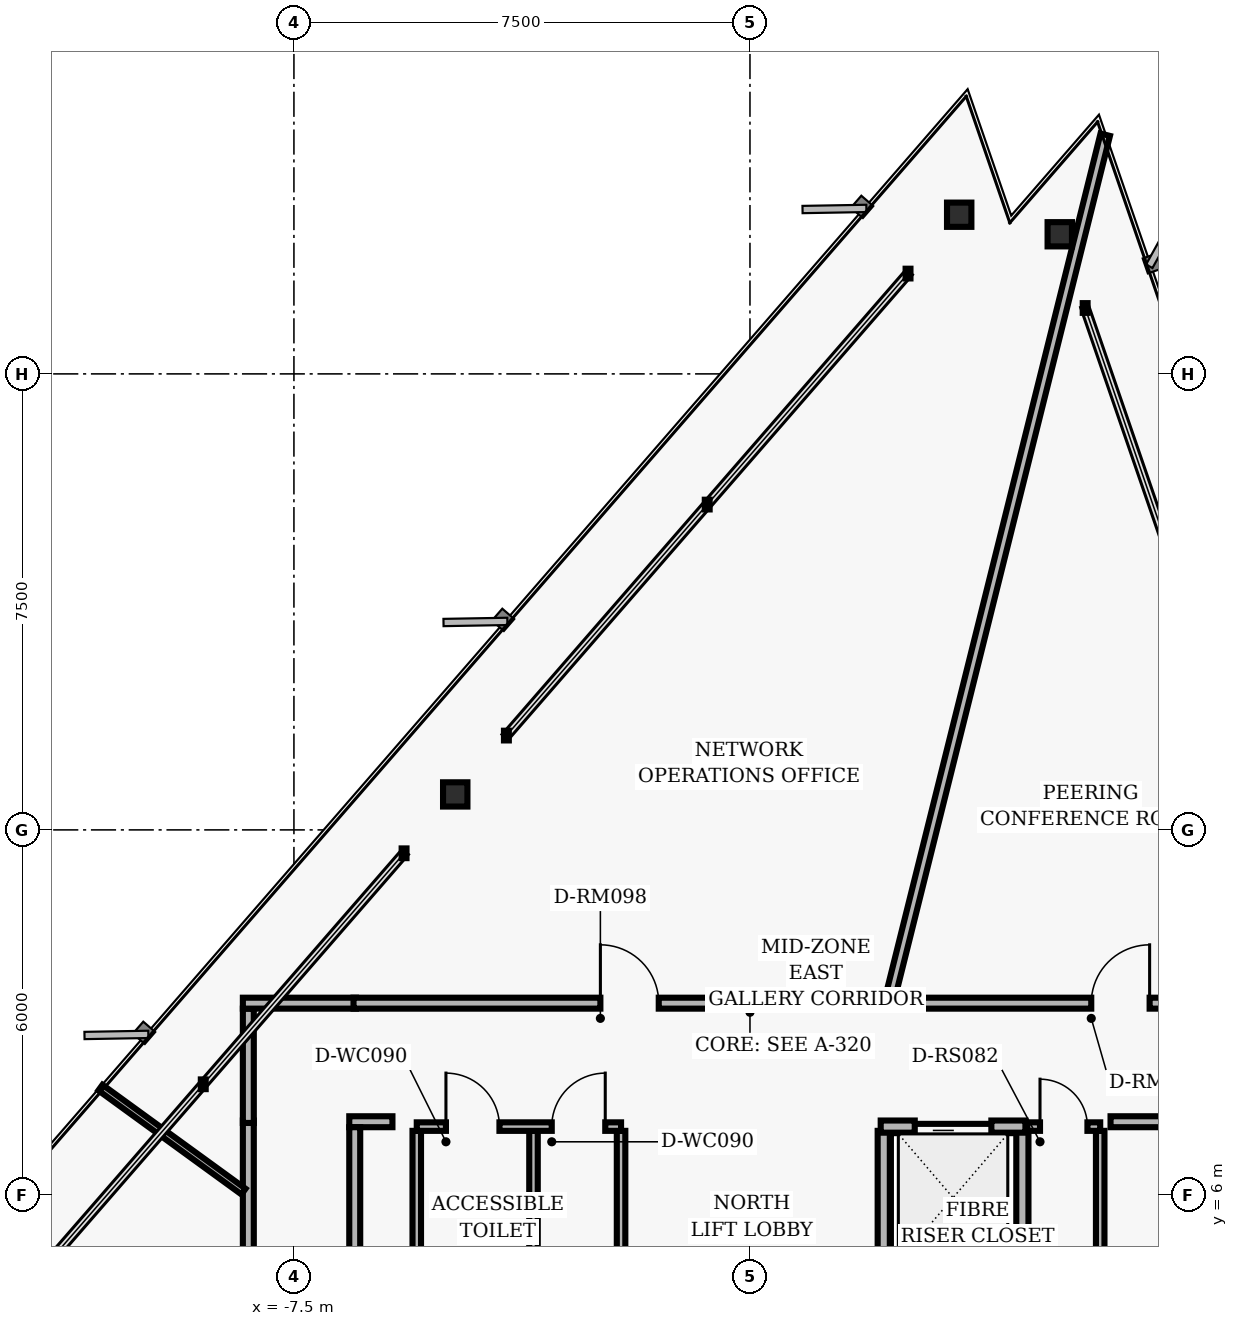
"""IFC4 building model, lengths in metres.
Left out: names, types, materials, properties, quantities, classifications, styles, units other than length and angle.
Written with IfcOpenShell. Run it as: python <this file> out.ifc"""

import sys

from ifc_helpers import new_model, si_unit, direction, frame, frame_2d, origin, origin_2d, place, context, subcontext, project, spatial, rectangle, i_section, extrude, element, fill, save


model = new_model("IFC4")
c1 = context("Model", 3, precision=1e-05, world=origin(), true_north=direction((0.0, 1.0)))
c2 = subcontext(c1, "Body", "Model", "MODEL_VIEW")
j1 = project(units=[si_unit("LENGTHUNIT", "METRE"), si_unit("PLANEANGLEUNIT", "RADIAN")], contexts=[c1])
p1 = place(None, origin())
s1 = spatial("IfcSite", under=j1, at=p1, CompositionType="ELEMENT")
p2 = place(p1, origin())
s2 = spatial("IfcBuilding", under=s1, at=p2, CompositionType="ELEMENT")
p3 = place(p2, frame((0.0, 0.0, 153.28)))
s3 = spatial("IfcBuildingStorey", under=s2, at=p3, CompositionType="ELEMENT", Elevation=153.28)
for number, where, z_axis, x_axis in (
    (1, (5.095, 21.796, 0.0), (0.0, 0.0, 1.0), (1.0, 0.0, 0.0)),
    (2, (3.441, 22.118, 0.0), (0.0, 0.0, 1.0), (1.0, 0.0, 0.0)),
    (3, (-4.847, 12.583, 0.0), (0.0, 0.0, 1.0), (1.0, 0.0, 0.0)),
):
    element("IfcColumn", number, at=place(p3, frame(where, z_axis=z_axis, x_axis=x_axis)), inside=s3, PredefinedType="COLUMN", context=c2, shape_type="SweptSolid", body=[
        extrude(i_section(OverallWidth=0.401, OverallDepth=0.399, WebThickness=0.025, FlangeThickness=0.04, FilletRadius=0.018, at=origin_2d()), origin(), (0.0, 0.0, 1.0), 3.04),
    ])
for number, where, z_axis, x_axis in (
    (4, (2.2, 4.95, 0.0), (0.0, 0.0, 1.0), (0.0, 1.0, 0.0)),
    (5, (4.48, 4.95, 0.0), (0.0, 0.0, 1.0), (0.0, 1.0, 0.0)),
):
    element("IfcWall", number, at=place(p3, frame(where, z_axis=z_axis, x_axis=x_axis)), inside=s3, PredefinedType="PARTITIONING", context=c2, shape_type="SweptSolid", body=[
        extrude(rectangle(XDim=2.1, YDim=0.2, at=frame_2d((1.05, 0.0))), origin(), (0.0, 0.0, 1.0), 2.763),
    ])
p4 = place(p3, frame((2.15, 7.12, 0.0), z_axis=(0.0, 0.0, 1.0), x_axis=(1.0, 0.0, 0.0)))
e6 = element("IfcWall", 6, at=p4, inside=s3, PredefinedType="PARTITIONING", context=c2, shape_type="SweptSolid", body=[
    extrude(rectangle(XDim=2.38, YDim=0.2, at=frame_2d((1.19, 0.0))), origin(), (0.0, 0.0, 1.0), 2.763),
])
p5 = place(p4, frame((0.56, 0.0, 0.0)))
e7 = element("IfcOpeningElement", 7, at=p5, cuts=e6, PredefinedType="OPENING", context=c2, shape_type="SweptSolid", body=[
    extrude(rectangle(XDim=1.26, YDim=2.06, at=frame_2d((0.63, 1.03))), frame((0.0, 0.11, 0.0), z_axis=(0.0, -1.0, 0.0), x_axis=(1.0, 0.0, 0.0)), (0.0, 0.0, 1.0), 0.22),
])
for number, where, z_axis, x_axis in (
    (8, (-5.48, 4.95, 0.0), (0.0, 0.0, 1.0), (0.0, 1.0, 0.0)),
    (9, (-3.56, 4.95, 0.0), (0.0, 0.0, 1.0), (0.0, 1.0, 0.0)),
    (10, (-2.12, 4.95, 0.0), (0.0, 0.0, 1.0), (0.0, 1.0, 0.0)),
):
    element("IfcWall", number, at=place(p3, frame(where, z_axis=z_axis, x_axis=x_axis)), inside=s3, PredefinedType="PARTITIONING", context=c2, shape_type="SweptSolid", body=[
        extrude(rectangle(XDim=2.1, YDim=0.14, at=frame_2d((1.05, 0.0))), origin(), (0.0, 0.0, 1.0), 2.763),
    ])
p6 = place(p3, frame((-5.48, 7.12, 0.0), z_axis=(0.0, 0.0, 1.0), x_axis=(1.0, 0.0, 0.0)))
e11 = element("IfcWall", 11, at=p6, inside=s3, PredefinedType="PARTITIONING", context=c2, shape_type="SweptSolid", body=[
    extrude(rectangle(XDim=3.36, YDim=0.14, at=frame_2d((1.68, 0.0))), origin(), (0.0, 0.0, 1.0), 2.763),
])
p7 = place(p6, frame((0.48, 0.0, 0.0)))
e12 = element("IfcOpeningElement", 12, at=p7, cuts=e11, PredefinedType="OPENING", context=c2, shape_type="SweptSolid", body=[
    extrude(rectangle(XDim=0.88, YDim=2.02, at=frame_2d((0.44, 1.01))), frame((0.0, 0.08, 0.0), z_axis=(0.0, -1.0, 0.0), x_axis=(1.0, 0.0, 0.0)), (0.0, 0.0, 1.0), 0.16),
])
p8 = place(p6, frame((2.22, 0.0, 0.0)))
e13 = element("IfcOpeningElement", 13, at=p8, cuts=e11, PredefinedType="OPENING", context=c2, shape_type="SweptSolid", body=[
    extrude(rectangle(XDim=0.88, YDim=2.02, at=frame_2d((0.44, 1.01))), frame((0.0, 0.08, 0.0), z_axis=(0.0, -1.0, 0.0), x_axis=(1.0, 0.0, 0.0)), (0.0, 0.0, 1.0), 0.16),
])
p9 = place(p3, frame((5.76, 4.95, 0.0), z_axis=(0.0, 0.0, 1.0), x_axis=(0.0, 1.0, 0.0)))
e14 = element("IfcWall", 14, at=p9, inside=s3, PredefinedType="PARTITIONING", context=c2, shape_type="SweptSolid", body=[
    extrude(rectangle(XDim=2.1, YDim=0.14, at=frame_2d((1.05, 0.0))), origin(), (0.0, 0.0, 1.0), 2.763),
])
p10 = place(p3, frame((4.56, 7.12, 0.0), z_axis=(0.0, 0.0, 1.0), x_axis=(1.0, 0.0, 0.0)))
e15 = element("IfcWall", 15, at=p10, inside=s3, PredefinedType="PARTITIONING", context=c2, shape_type="SweptSolid", body=[
    extrude(rectangle(XDim=1.2, YDim=0.14, at=frame_2d((0.6, 0.0))), origin(), (0.0, 0.0, 1.0), 2.763),
])
p11 = place(p10, frame((0.21, 0.0, 0.0)))
e16 = element("IfcOpeningElement", 16, at=p11, cuts=e15, PredefinedType="OPENING", context=c2, shape_type="SweptSolid", body=[
    extrude(rectangle(XDim=0.78, YDim=2.01, at=frame_2d((0.39, 1.005))), frame((0.0, 0.08, 0.0), z_axis=(0.0, -1.0, 0.0), x_axis=(1.0, 0.0, 0.0)), (0.0, 0.0, 1.0), 0.16),
])
p12 = place(p3, frame((-8.25, -7.22, 0.0), z_axis=(0.0, 0.0, 1.0), x_axis=(0.0, 1.0, 0.0)))
e17 = element("IfcWall", 17, at=p12, inside=s3, PredefinedType="PARTITIONING", context=c2, shape_type="SweptSolid", body=[
    extrude(rectangle(XDim=14.44, YDim=0.18, at=frame_2d((7.22, 0.0))), origin(), (0.0, 0.0, 1.0), 2.763),
])
p13 = place(p12, frame((7.366, 0.0, 0.0)))
e18 = element("IfcOpeningElement", 18, at=p13, cuts=e17, PredefinedType="OPENING", context=c2, shape_type="SweptSolid", body=[
    extrude(rectangle(XDim=0.96, YDim=2.02, at=frame_2d((0.48, 1.01))), frame((0.0, 0.1, 0.0), z_axis=(0.0, -1.0, 0.0), x_axis=(1.0, 0.0, 0.0)), (0.0, 0.0, 1.0), 0.2),
])
p14 = place(p3, frame((-8.25, 7.18, 0.0), z_axis=(0.0, 0.0, 1.0), x_axis=(0.0, 1.0, 0.0)))
e19 = element("IfcWall", 19, at=p14, inside=s3, PredefinedType="PARTITIONING", context=c2, shape_type="SweptSolid", body=[
    extrude(rectangle(XDim=1.88, YDim=0.18, at=frame_2d((0.94, 0.0))), origin(), (0.0, 0.0, 1.0), 2.763),
])
p15 = place(p3, frame((-8.34, 9.15, 0.0), z_axis=(0.0, 0.0, 1.0), x_axis=(1.0, 0.0, 0.0)))
e20 = element("IfcWall", 20, at=p15, inside=s3, PredefinedType="PARTITIONING", context=c2, shape_type="SweptSolid", body=[
    extrude(rectangle(XDim=1.86, YDim=0.18, at=frame_2d((0.93, 0.0))), origin(), (0.0, 0.0, 1.0), 2.763),
])
p16 = place(p3, frame((-6.52, 9.15, 0.0), z_axis=(0.0, 0.0, 1.0), x_axis=(1.0, 0.0, 0.0)))
e21 = element("IfcWall", 21, at=p16, inside=s3, PredefinedType="PARTITIONING", context=c2, shape_type="SweptSolid", body=[
    extrude(rectangle(XDim=16.662, YDim=0.18, at=frame_2d((8.331, 0.0))), origin(), (0.0, 0.0, 1.0), 2.763),
])
p17 = place(p16, frame((12.133, 0.0, 0.0)))
e22 = element("IfcOpeningElement", 22, at=p17, cuts=e21, PredefinedType="OPENING", context=c2, shape_type="SweptSolid", body=[
    extrude(rectangle(XDim=0.96, YDim=2.02, at=frame_2d((0.48, 1.01))), frame((0.0, 0.1, 0.0), z_axis=(0.0, -1.0, 0.0), x_axis=(1.0, 0.0, 0.0)), (0.0, 0.0, 1.0), 0.2),
])
p18 = place(p16, frame((4.06, 0.0, 0.0)))
e23 = element("IfcOpeningElement", 23, at=p18, cuts=e21, PredefinedType="OPENING", context=c2, shape_type="SweptSolid", body=[
    extrude(rectangle(XDim=0.96, YDim=2.02, at=frame_2d((0.48, 1.01))), frame((0.0, 0.1, 0.0), z_axis=(0.0, -1.0, 0.0), x_axis=(1.0, 0.0, 0.0)), (0.0, 0.0, 1.0), 0.2),
])
p19 = place(p3, frame((10.814, 7.2, 0.0), z_axis=(0.0, 0.0, 1.0), x_axis=(-1.0, 0.0, 0.0)))
e24 = element("IfcWall", 24, at=p19, inside=s3, PredefinedType="PARTITIONING", context=c2, shape_type="SweptSolid", body=[
    extrude(rectangle(XDim=4.884, YDim=0.18, at=frame_2d((2.442, 0.0))), origin(), (0.0, 0.0, 1.0), 2.763),
])
p20 = place(p3, frame((-5.88, 7.2, 0.0), z_axis=(0.0, 0.0, 1.0), x_axis=(-1.0, 0.0, 0.0)))
e25 = element("IfcWall", 25, at=p20, inside=s3, PredefinedType="PARTITIONING", context=c2, shape_type="SweptSolid", body=[
    extrude(rectangle(XDim=0.71, YDim=0.18, at=frame_2d((0.355, 0.0))), origin(), (0.0, 0.0, 1.0), 2.763),
])
p21 = place(p3, frame((-6.5, 7.11, 0.0), z_axis=(0.0, 0.0, 1.0), x_axis=(0.0, -1.0, 0.0)))
e26 = element("IfcWall", 26, at=p21, inside=s3, PredefinedType="PARTITIONING", context=c2, shape_type="SweptSolid", body=[
    extrude(rectangle(XDim=2.058, YDim=0.18, at=frame_2d((1.029, 0.0))), origin(), (0.0, 0.0, 1.0), 2.763),
])
p22 = place(p3, frame((2.301, 9.23, 0.0), z_axis=(0.0, 0.0, 1.0), x_axis=(0.241931245301, 0.970293395086, 0.0)))
e27 = element("IfcWall", 27, at=p22, inside=s3, PredefinedType="PARTITIONING", context=c2, shape_type="SweptSolid", body=[
    extrude(rectangle(XDim=14.638, YDim=0.16, at=frame_2d((7.319, 0.0))), origin(), (0.0, 0.0, 1.0), 2.763),
])
p23 = place(p3, frame((-8.33, 6.052, 0.0), z_axis=(0.0, 0.0, 1.0), x_axis=(-0.808997455981, 0.587812143644, 0.0)))
e28 = element("IfcWall", 28, at=p23, inside=s3, PredefinedType="MOVABLE", context=c2, shape_type="SweptSolid", body=[
    extrude(rectangle(XDim=2.907, YDim=0.115, at=frame_2d((1.454, 0.0))), origin(), (0.0, 0.0, 1.0), 2.763),
])
p24 = place(p5, origin())
e29 = element("IfcDoor", 29, at=p24, inside=s3, OperationType="SLIDING_TO_LEFT", PredefinedType="DOOR", context=c2, shape_type="SweptSolid", body=[
    extrude(rectangle(XDim=1.26, YDim=2.06, at=frame_2d((0.63, 1.03))), frame((0.0, 0.025, 0.0), z_axis=(0.0, -1.0, 0.0), x_axis=(1.0, 0.0, 0.0)), (0.0, 0.0, 1.0), 0.05),
])
fill(e7, e29)
p25 = place(p7, origin())
e30 = element("IfcDoor", 30, at=p25, inside=s3, OperationType="SINGLE_SWING_LEFT", PredefinedType="DOOR", context=c2, shape_type="SweptSolid", body=[
    extrude(rectangle(XDim=0.88, YDim=2.02, at=frame_2d((0.44, 1.01))), frame((0.0, 0.025, 0.0), z_axis=(0.0, -1.0, 0.0), x_axis=(1.0, 0.0, 0.0)), (0.0, 0.0, 1.0), 0.05),
])
fill(e12, e30)
p26 = place(p8, origin())
e31 = element("IfcDoor", 31, at=p26, inside=s3, OperationType="SINGLE_SWING_RIGHT", PredefinedType="DOOR", context=c2, shape_type="SweptSolid", body=[
    extrude(rectangle(XDim=0.88, YDim=2.02, at=frame_2d((0.44, 1.01))), frame((0.0, 0.025, 0.0), z_axis=(0.0, -1.0, 0.0), x_axis=(1.0, 0.0, 0.0)), (0.0, 0.0, 1.0), 0.05),
])
fill(e13, e31)
p27 = place(p11, origin())
e32 = element("IfcDoor", 32, at=p27, inside=s3, OperationType="SINGLE_SWING_LEFT", PredefinedType="DOOR", context=c2, shape_type="SweptSolid", body=[
    extrude(rectangle(XDim=0.78, YDim=2.01, at=frame_2d((0.39, 1.005))), frame((0.0, 0.025, 0.0), z_axis=(0.0, -1.0, 0.0), x_axis=(1.0, 0.0, 0.0)), (0.0, 0.0, 1.0), 0.05),
])
fill(e16, e32)
p28 = place(p17, origin())
e33 = element("IfcDoor", 33, at=p28, inside=s3, OperationType="SINGLE_SWING_RIGHT", PredefinedType="DOOR", context=c2, shape_type="SweptSolid", body=[
    extrude(rectangle(XDim=0.96, YDim=2.02, at=frame_2d((0.48, 1.01))), frame((0.0, 0.025, 0.0), z_axis=(0.0, -1.0, 0.0), x_axis=(1.0, 0.0, 0.0)), (0.0, 0.0, 1.0), 0.05),
])
fill(e22, e33)
p29 = place(p18, origin())
e34 = element("IfcDoor", 34, at=p29, inside=s3, OperationType="SINGLE_SWING_LEFT", PredefinedType="DOOR", context=c2, shape_type="SweptSolid", body=[
    extrude(rectangle(XDim=0.96, YDim=2.02, at=frame_2d((0.48, 1.01))), frame((0.0, 0.025, 0.0), z_axis=(0.0, -1.0, 0.0), x_axis=(1.0, 0.0, 0.0)), (0.0, 0.0, 1.0), 0.05),
])
fill(e23, e34)
save(model, sys.argv[1])
